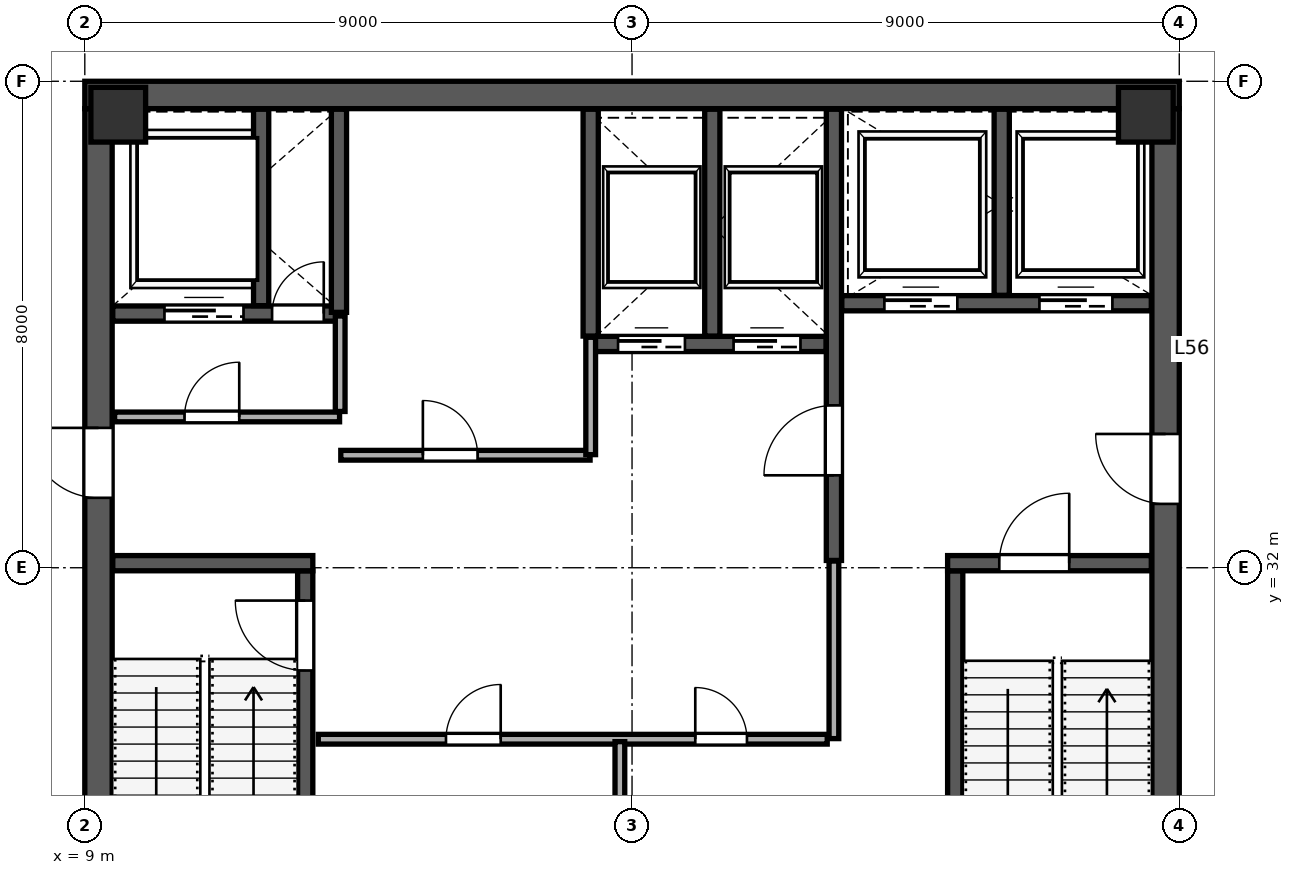
"""IFC4 building model, lengths in metres.
Left out: names, types, materials, properties, quantities, classifications, styles, units other than length and angle.
Written with IfcOpenShell. Run it as: python <this file> out.ifc"""

import sys

from ifc_helpers import new_model, si_unit, direction, frame, frame_2d, origin, origin_2d, place, context, subcontext, project, spatial, rectangle, extrude, source, transform, mapped, element, fill, save


model = new_model("IFC4")
c1 = context("Model", 3, precision=1e-05, world=origin(), true_north=direction((0.0, 1.0)))
c2 = subcontext(c1, "Body", "Model", "MODEL_VIEW")
j1 = project(units=[si_unit("LENGTHUNIT", "METRE"), si_unit("PLANEANGLEUNIT", "RADIAN")], contexts=[c1])
p1 = place(None, origin())
s1 = spatial("IfcSite", under=j1, at=p1, CompositionType="ELEMENT")
p2 = place(p1, origin())
s2 = spatial("IfcBuilding", under=s1, at=p2, CompositionType="ELEMENT")
p3 = place(p2, frame((0.0, 0.0, 250.0)))
s3 = spatial("IfcBuildingStorey", under=s2, at=p3, CompositionType="ELEMENT", Elevation=250.0)
m1 = source(origin(), c2, "Body", "SweptSolid", [
    extrude(rectangle(XDim=0.9, YDim=0.9, at=origin_2d()), origin(), (0.0, 0.0, 1.0), 4.198),
])
for number, where, z_axis, x_axis in (
    (1, (9.55, 39.45, 0.001), (0.0, 0.0, 1.0), (1.0, 0.0, 0.0)),
    (2, (26.45, 39.45, 0.001), (0.0, 0.0, 1.0), (1.0, 0.0, 0.0)),
):
    element("IfcColumn", number, at=place(p3, frame(where, z_axis=z_axis, x_axis=x_axis)), inside=s3, PredefinedType="COLUMN", context=c2, shape_type="MappedRepresentation", body=[
        mapped(m1, transform((0.0, 0.0, 0.0), scale=1.0)),
    ])
p4 = place(p3, frame((9.225, 24.45, 0.0), z_axis=(0.0, 0.0, 1.0), x_axis=(0.0, 1.0, 0.0)))
e3 = element("IfcWall", 3, at=p4, inside=s3, PredefinedType="SHEAR", context=c2, shape_type="SweptSolid", body=[
    extrude(rectangle(XDim=15.1, YDim=0.45, at=frame_2d((7.55, 0.0))), origin(), (0.0, 0.0, 1.0), 3.96),
])
p5 = place(p4, frame((8.7, 0.0, 0.0)))
e4 = element("IfcOpeningElement", 4, at=p5, cuts=e3, PredefinedType="OPENING", context=c2, shape_type="SweptSolid", body=[
    extrude(rectangle(XDim=1.15, YDim=2.2, at=frame_2d((0.575, 1.1))), frame((0.0, 0.235, 0.0), z_axis=(0.0, -1.0, 0.0), x_axis=(1.0, 0.0, 0.0)), (0.0, 0.0, 1.0), 0.47),
])
p6 = place(p3, frame((26.775, 24.45, 0.0), z_axis=(0.0, 0.0, 1.0), x_axis=(0.0, 1.0, 0.0)))
e5 = element("IfcWall", 5, at=p6, inside=s3, PredefinedType="SHEAR", context=c2, shape_type="SweptSolid", body=[
    extrude(rectangle(XDim=15.1, YDim=0.45, at=frame_2d((7.55, 0.0))), origin(), (0.0, 0.0, 1.0), 3.96),
])
p7 = place(p6, frame((8.6, 0.0, 0.0)))
e6 = element("IfcOpeningElement", 6, at=p7, cuts=e5, PredefinedType="OPENING", context=c2, shape_type="SweptSolid", body=[
    extrude(rectangle(XDim=1.15, YDim=2.2, at=frame_2d((0.575, 1.1))), frame((0.0, 0.235, 0.0), z_axis=(0.0, -1.0, 0.0), x_axis=(1.0, 0.0, 0.0)), (0.0, 0.0, 1.0), 0.47),
])
p8 = place(p3, frame((9.0, 39.775, 0.0), z_axis=(0.0, 0.0, 1.0), x_axis=(1.0, 0.0, 0.0)))
e7 = element("IfcWall", 7, at=p8, inside=s3, PredefinedType="SHEAR", context=c2, shape_type="SweptSolid", body=[
    extrude(rectangle(XDim=18.0, YDim=0.45, at=frame_2d((9.0, 0.0))), origin(), (0.0, 0.0, 1.0), 3.96),
])
p9 = place(p3, frame((12.625, 24.46, 0.0), z_axis=(0.0, 0.0, 1.0), x_axis=(0.0, 1.0, 0.0)))
e8 = element("IfcWall", 8, at=p9, inside=s3, PredefinedType="SHEAR", context=c2, shape_type="SweptSolid", body=[
    extrude(rectangle(XDim=7.49, YDim=0.25, at=frame_2d((3.745, 0.0))), origin(), (0.0, 0.0, 1.0), 3.96),
])
p10 = place(p9, frame((5.85, 0.0, 0.0)))
e9 = element("IfcOpeningElement", 9, at=p10, cuts=e8, PredefinedType="OPENING", context=c2, shape_type="SweptSolid", body=[
    extrude(rectangle(XDim=1.15, YDim=2.2, at=frame_2d((0.575, 1.1))), frame((0.0, 0.135, 0.0), z_axis=(0.0, -1.0, 0.0), x_axis=(1.0, 0.0, 0.0)), (0.0, 0.0, 1.0), 0.27),
])
p11 = place(p3, frame((9.46, 32.075, 0.0), z_axis=(0.0, 0.0, 1.0), x_axis=(1.0, 0.0, 0.0)))
e10 = element("IfcWall", 10, at=p11, inside=s3, PredefinedType="SHEAR", context=c2, shape_type="SweptSolid", body=[
    extrude(rectangle(XDim=3.29, YDim=0.25, at=frame_2d((1.645, 0.0))), origin(), (0.0, 0.0, 1.0), 3.96),
])
p12 = place(p3, frame((23.315, 24.46, 0.0), z_axis=(0.0, 0.0, 1.0), x_axis=(0.0, 1.0, 0.0)))
e11 = element("IfcWall", 11, at=p12, inside=s3, PredefinedType="SHEAR", context=c2, shape_type="SweptSolid", body=[
    extrude(rectangle(XDim=7.49, YDim=0.25, at=frame_2d((3.745, 0.0))), origin(), (0.0, 0.0, 1.0), 3.96),
])
p13 = place(p3, frame((23.19, 32.075, 0.0), z_axis=(0.0, 0.0, 1.0), x_axis=(1.0, 0.0, 0.0)))
e12 = element("IfcWall", 12, at=p13, inside=s3, PredefinedType="SHEAR", context=c2, shape_type="SweptSolid", body=[
    extrude(rectangle(XDim=3.35, YDim=0.25, at=frame_2d((1.675, 0.0))), origin(), (0.0, 0.0, 1.0), 3.96),
])
p14 = place(p13, frame((0.85, 0.0, 0.0)))
e13 = element("IfcOpeningElement", 13, at=p14, cuts=e12, PredefinedType="OPENING", context=c2, shape_type="SweptSolid", body=[
    extrude(rectangle(XDim=1.15, YDim=2.2, at=frame_2d((0.575, 1.1))), frame((0.0, 0.135, 0.0), z_axis=(0.0, -1.0, 0.0), x_axis=(1.0, 0.0, 0.0)), (0.0, 0.0, 1.0), 0.27),
])
p15 = place(p3, frame((21.32, 32.12, 0.0), z_axis=(0.0, 0.0, 1.0), x_axis=(0.0, 1.0, 0.0)))
e14 = element("IfcWall", 14, at=p15, inside=s3, PredefinedType="SHEAR", context=c2, shape_type="SweptSolid", body=[
    extrude(rectangle(XDim=7.42, YDim=0.25, at=frame_2d((3.71, 0.0))), origin(), (0.0, 0.0, 1.0), 3.96),
])
p16 = place(p15, frame((1.4, 0.0, 0.0)))
e15 = element("IfcOpeningElement", 15, at=p16, cuts=e14, PredefinedType="OPENING", context=c2, shape_type="SweptSolid", body=[
    extrude(rectangle(XDim=1.15, YDim=2.2, at=frame_2d((0.575, 1.1))), frame((0.0, 0.135, 0.0), z_axis=(0.0, -1.0, 0.0), x_axis=(1.0, 0.0, 0.0)), (0.0, 0.0, 1.0), 0.27),
])
p17 = place(p3, frame((9.46, 36.18, 0.0), z_axis=(0.0, 0.0, 1.0), x_axis=(1.0, 0.0, 0.0)))
e16 = element("IfcWall", 16, at=p17, inside=s3, PredefinedType="SHEAR", context=c2, shape_type="SweptSolid", body=[
    extrude(rectangle(XDim=3.79, YDim=0.25, at=frame_2d((1.895, 0.0))), origin(), (0.0, 0.0, 1.0), 3.96),
])
p18 = place(p17, frame((2.62, 0.0, 0.0)))
e17 = element("IfcOpeningElement", 17, at=p18, cuts=e16, PredefinedType="OPENING", context=c2, shape_type="SweptSolid", body=[
    extrude(rectangle(XDim=0.85, YDim=2.1, at=frame_2d((0.425, 1.05))), frame((0.0, 0.135, 0.0), z_axis=(0.0, -1.0, 0.0), x_axis=(1.0, 0.0, 0.0)), (0.0, 0.0, 1.0), 0.27),
])
p19 = place(p17, frame((0.85, 0.0, 0.0)))
e18 = element("IfcOpeningElement", 18, at=p19, cuts=e16, PredefinedType="OPENING", context=c2, shape_type="SweptSolid", body=[
    extrude(rectangle(XDim=1.3, YDim=2.25, at=frame_2d((0.65, 1.125))), frame((0.0, 0.135, 0.0), z_axis=(0.0, -1.0, 0.0), x_axis=(1.0, 0.0, 0.0)), (0.0, 0.0, 1.0), 0.27),
])
p20 = place(p3, frame((11.9, 36.31, 0.0), z_axis=(0.0, 0.0, 1.0), x_axis=(0.0, 1.0, 0.0)))
e19 = element("IfcWall", 19, at=p20, inside=s3, PredefinedType="SHEAR", context=c2, shape_type="SweptSolid", body=[
    extrude(rectangle(XDim=3.23, YDim=0.25, at=frame_2d((1.615, 0.0))), origin(), (0.0, 0.0, 1.0), 3.96),
])
p21 = place(p3, frame((21.45, 36.35, 0.0), z_axis=(0.0, 0.0, 1.0), x_axis=(1.0, 0.0, 0.0)))
e20 = element("IfcWall", 20, at=p21, inside=s3, PredefinedType="SHEAR", context=c2, shape_type="SweptSolid", body=[
    extrude(rectangle(XDim=5.09, YDim=0.25, at=frame_2d((2.545, 0.0))), origin(), (0.0, 0.0, 1.0), 3.96),
])
p22 = place(p21, frame((0.7, 0.0, 0.0)))
e21 = element("IfcOpeningElement", 21, at=p22, cuts=e20, PredefinedType="OPENING", context=c2, shape_type="SweptSolid", body=[
    extrude(rectangle(XDim=1.2, YDim=2.2, at=frame_2d((0.6, 1.1))), frame((0.0, 0.135, 0.0), z_axis=(0.0, -1.0, 0.0), x_axis=(1.0, 0.0, 0.0)), (0.0, 0.0, 1.0), 0.27),
])
p23 = place(p21, frame((3.25, 0.0, 0.0)))
e22 = element("IfcOpeningElement", 22, at=p23, cuts=e20, PredefinedType="OPENING", context=c2, shape_type="SweptSolid", body=[
    extrude(rectangle(XDim=1.2, YDim=2.2, at=frame_2d((0.6, 1.1))), frame((0.0, 0.135, 0.0), z_axis=(0.0, -1.0, 0.0), x_axis=(1.0, 0.0, 0.0)), (0.0, 0.0, 1.0), 0.27),
])
p24 = place(p3, frame((24.08, 36.48, 0.0), z_axis=(0.0, 0.0, 1.0), x_axis=(0.0, 1.0, 0.0)))
e23 = element("IfcWall", 23, at=p24, inside=s3, PredefinedType="SHEAR", context=c2, shape_type="SweptSolid", body=[
    extrude(rectangle(XDim=3.06, YDim=0.25, at=frame_2d((1.53, 0.0))), origin(), (0.0, 0.0, 1.0), 3.96),
])
p25 = place(p3, frame((13.18, 36.2, 0.0), z_axis=(0.0, 0.0, 1.0), x_axis=(0.0, 1.0, 0.0)))
e24 = element("IfcWall", 24, at=p25, inside=s3, PredefinedType="SHEAR", context=c2, shape_type="SweptSolid", body=[
    extrude(rectangle(XDim=3.34, YDim=0.25, at=frame_2d((1.67, 0.0))), origin(), (0.0, 0.0, 1.0), 3.96),
])
p26 = place(p3, frame((17.32, 35.68, 0.0), z_axis=(0.0, 0.0, 1.0), x_axis=(1.0, 0.0, 0.0)))
e25 = element("IfcWall", 25, at=p26, inside=s3, PredefinedType="SHEAR", context=c2, shape_type="SweptSolid", body=[
    extrude(rectangle(XDim=3.87, YDim=0.25, at=frame_2d((1.935, 0.0))), origin(), (0.0, 0.0, 1.0), 3.96),
])
p27 = place(p26, frame((0.45, 0.0, 0.0)))
e26 = element("IfcOpeningElement", 26, at=p27, cuts=e25, PredefinedType="OPENING", context=c2, shape_type="SweptSolid", body=[
    extrude(rectangle(XDim=1.1, YDim=2.2, at=frame_2d((0.55, 1.1))), frame((0.0, 0.135, 0.0), z_axis=(0.0, -1.0, 0.0), x_axis=(1.0, 0.0, 0.0)), (0.0, 0.0, 1.0), 0.27),
])
p28 = place(p26, frame((2.35, 0.0, 0.0)))
e27 = element("IfcOpeningElement", 27, at=p28, cuts=e25, PredefinedType="OPENING", context=c2, shape_type="SweptSolid", body=[
    extrude(rectangle(XDim=1.1, YDim=2.2, at=frame_2d((0.55, 1.1))), frame((0.0, 0.135, 0.0), z_axis=(0.0, -1.0, 0.0), x_axis=(1.0, 0.0, 0.0)), (0.0, 0.0, 1.0), 0.27),
])
for number, where, z_axis, x_axis in (
    (28, (17.32, 35.81, 0.0), (0.0, 0.0, 1.0), (0.0, 1.0, 0.0)),
    (29, (19.32, 35.81, 0.0), (0.0, 0.0, 1.0), (0.0, 1.0, 0.0)),
):
    element("IfcWall", number, at=place(p3, frame(where, z_axis=z_axis, x_axis=x_axis)), inside=s3, PredefinedType="SHEAR", context=c2, shape_type="SweptSolid", body=[
        extrude(rectangle(XDim=3.73, YDim=0.25, at=frame_2d((1.865, 0.0))), origin(), (0.0, 0.0, 1.0), 3.96),
    ])
p29 = place(p3, frame((9.49, 34.48, 0.0), z_axis=(0.0, 0.0, 1.0), x_axis=(1.0, 0.0, 0.0)))
e30 = element("IfcWall", 30, at=p29, inside=s3, PredefinedType="PARTITIONING", context=c2, shape_type="SweptSolid", body=[
    extrude(rectangle(XDim=3.7, YDim=0.16, at=frame_2d((1.85, 0.0))), origin(), (0.0, 0.0, 1.0), 3.96),
])
p30 = place(p29, frame((1.15, 0.0, 0.0)))
e31 = element("IfcOpeningElement", 31, at=p30, cuts=e30, PredefinedType="OPENING", context=c2, shape_type="SweptSolid", body=[
    extrude(rectangle(XDim=0.9, YDim=2.15, at=frame_2d((0.45, 1.075))), frame((0.0, 0.09, 0.0), z_axis=(0.0, -1.0, 0.0), x_axis=(1.0, 0.0, 0.0)), (0.0, 0.0, 1.0), 0.18),
])
p31 = place(p3, frame((13.2, 34.57, 0.0), z_axis=(0.0, 0.0, 1.0), x_axis=(0.0, 1.0, 0.0)))
e32 = element("IfcWall", 32, at=p31, inside=s3, PredefinedType="PARTITIONING", context=c2, shape_type="SweptSolid", body=[
    extrude(rectangle(XDim=1.57, YDim=0.16, at=frame_2d((0.785, 0.0))), origin(), (0.0, 0.0, 1.0), 3.96),
])
p32 = place(p3, frame((13.21, 33.85, 0.0), z_axis=(0.0, 0.0, 1.0), x_axis=(1.0, 0.0, 0.0)))
e33 = element("IfcWall", 33, at=p32, inside=s3, PredefinedType="PARTITIONING", context=c2, shape_type="SweptSolid", body=[
    extrude(rectangle(XDim=4.1, YDim=0.16, at=frame_2d((2.05, 0.0))), origin(), (0.0, 0.0, 1.0), 3.96),
])
p33 = place(p32, frame((1.35, 0.0, 0.0)))
e34 = element("IfcOpeningElement", 34, at=p33, cuts=e33, PredefinedType="OPENING", context=c2, shape_type="SweptSolid", body=[
    extrude(rectangle(XDim=0.9, YDim=2.15, at=frame_2d((0.45, 1.075))), frame((0.0, 0.09, 0.0), z_axis=(0.0, -1.0, 0.0), x_axis=(1.0, 0.0, 0.0)), (0.0, 0.0, 1.0), 0.18),
])
p34 = place(p3, frame((17.32, 33.86, 0.0), z_axis=(0.0, 0.0, 1.0), x_axis=(0.0, 1.0, 0.0)))
e35 = element("IfcWall", 35, at=p34, inside=s3, PredefinedType="PARTITIONING", context=c2, shape_type="SweptSolid", body=[
    extrude(rectangle(XDim=1.93, YDim=0.16, at=frame_2d((0.965, 0.0))), origin(), (0.0, 0.0, 1.0), 3.96),
])
p35 = place(p3, frame((12.84, 29.18, 0.0), z_axis=(0.0, 0.0, 1.0), x_axis=(1.0, 0.0, 0.0)))
e36 = element("IfcWall", 36, at=p35, inside=s3, PredefinedType="PARTITIONING", context=c2, shape_type="SweptSolid", body=[
    extrude(rectangle(XDim=8.37, YDim=0.16, at=frame_2d((4.185, 0.0))), origin(), (0.0, 0.0, 1.0), 3.96),
])
p36 = place(p35, frame((2.1, 0.0, 0.0)))
e37 = element("IfcOpeningElement", 37, at=p36, cuts=e36, PredefinedType="OPENING", context=c2, shape_type="SweptSolid", body=[
    extrude(rectangle(XDim=0.9, YDim=2.15, at=frame_2d((0.45, 1.075))), frame((0.0, 0.09, 0.0), z_axis=(0.0, -1.0, 0.0), x_axis=(1.0, 0.0, 0.0)), (0.0, 0.0, 1.0), 0.18),
])
p37 = place(p35, frame((6.2, 0.0, 0.0)))
e38 = element("IfcOpeningElement", 38, at=p37, cuts=e36, PredefinedType="OPENING", context=c2, shape_type="SweptSolid", body=[
    extrude(rectangle(XDim=0.85, YDim=2.1, at=frame_2d((0.425, 1.05))), frame((0.0, 0.09, 0.0), z_axis=(0.0, -1.0, 0.0), x_axis=(1.0, 0.0, 0.0)), (0.0, 0.0, 1.0), 0.18),
])
p38 = place(p3, frame((17.8, 24.54, 0.0), z_axis=(0.0, 0.0, 1.0), x_axis=(0.0, 1.0, 0.0)))
e39 = element("IfcWall", 39, at=p38, inside=s3, PredefinedType="PARTITIONING", context=c2, shape_type="SweptSolid", body=[
    extrude(rectangle(XDim=4.6, YDim=0.16, at=frame_2d((2.3, 0.0))), origin(), (0.0, 0.0, 1.0), 3.96),
])
p39 = place(p3, frame((21.32, 29.19, 0.0), z_axis=(0.0, 0.0, 1.0), x_axis=(0.0, 1.0, 0.0)))
e40 = element("IfcWall", 40, at=p39, inside=s3, PredefinedType="PARTITIONING", context=c2, shape_type="SweptSolid", body=[
    extrude(rectangle(XDim=2.92, YDim=0.16, at=frame_2d((1.46, 0.0))), origin(), (0.0, 0.0, 1.0), 3.96),
])
p40 = place(p3, frame((17.993, 51.134, 0.0), z_axis=(0.0, 0.0, 1.0), x_axis=(0.707106781187, -0.707106781187, 0.0)))
e41 = element("IfcWall", 41, at=p40, inside=s3, PredefinedType="PARTITIONING", context=c2, shape_type="SweptSolid", body=[
    extrude(rectangle(XDim=22.27, YDim=0.1, at=frame_2d((11.135, 0.0))), origin(), (0.0, 0.0, 1.0), 3.96),
])
p41 = place(p40, frame((10.8, 0.0, 0.0)))
e42 = element("IfcOpeningElement", 42, at=p41, cuts=e41, PredefinedType="OPENING", context=c2, shape_type="SweptSolid", body=[
    extrude(rectangle(XDim=0.95, YDim=2.15, at=frame_2d((0.475, 1.075))), frame((0.0, 0.06, 0.0), z_axis=(0.0, -1.0, 0.0), x_axis=(1.0, 0.0, 0.0)), (0.0, 0.0, 1.0), 0.12),
])
p42 = place(p3, frame((0.775, 33.973, 0.0), z_axis=(0.0, 0.0, 1.0), x_axis=(0.707106781187, 0.707106781187, 0.0)))
e43 = element("IfcWall", 43, at=p42, inside=s3, PredefinedType="PARTITIONING", context=c2, shape_type="SweptSolid", body=[
    extrude(rectangle(XDim=29.28, YDim=0.115, at=frame_2d((14.64, 0.0))), origin(), (0.0, 0.0, 1.0), 3.96),
])
p43 = place(p42, frame((2.2, 0.0, 0.0)))
e44 = element("IfcOpeningElement", 44, at=p43, cuts=e43, PredefinedType="OPENING", context=c2, shape_type="SweptSolid", body=[
    extrude(rectangle(XDim=0.95, YDim=2.15, at=frame_2d((0.475, 1.075))), frame((0.0, 0.067, 0.0), z_axis=(0.0, -1.0, 0.0), x_axis=(1.0, 0.0, 0.0)), (0.0, 0.0, 1.0), 0.135),
])
m2 = source(origin(), c2, "Body", "SweptSolid", [
    extrude(rectangle(XDim=1.15, YDim=2.2, at=frame_2d((0.575, 1.1))), frame((0.0, 0.025, 0.0), z_axis=(0.0, -1.0, 0.0), x_axis=(1.0, 0.0, 0.0)), (0.0, 0.0, 1.0), 0.05),
])
p44 = place(p10, origin())
e45 = element("IfcDoor", 45, at=p44, inside=s3, OperationType="SINGLE_SWING_RIGHT", PredefinedType="DOOR", context=c2, shape_type="MappedRepresentation", body=[
    mapped(m2, transform((0.0, 0.0, 0.0), scale=1.0)),
])
fill(e9, e45)
m3 = source(origin(), c2, "Body", "SweptSolid", [
    extrude(rectangle(XDim=1.15, YDim=2.2, at=frame_2d((0.575, 1.1))), frame((0.0, 0.025, 0.0), z_axis=(0.0, -1.0, 0.0), x_axis=(1.0, 0.0, 0.0)), (0.0, 0.0, 1.0), 0.05),
])
p45 = place(p16, origin())
e46 = element("IfcDoor", 46, at=p45, inside=s3, OperationType="SINGLE_SWING_LEFT", PredefinedType="DOOR", context=c2, shape_type="MappedRepresentation", body=[
    mapped(m3, transform((0.0, 0.0, 0.0), scale=1.0)),
])
fill(e15, e46)
p46 = place(p14, origin())
e47 = element("IfcDoor", 47, at=p46, inside=s3, OperationType="SINGLE_SWING_RIGHT", PredefinedType="DOOR", context=c2, shape_type="MappedRepresentation", body=[
    mapped(m2, transform((0.0, 0.0, 0.0), scale=1.0)),
])
fill(e13, e47)
p47 = place(p7, origin())
e48 = element("IfcDoor", 48, at=p47, inside=s3, OperationType="SINGLE_SWING_RIGHT", PredefinedType="DOOR", context=c2, shape_type="MappedRepresentation", body=[
    mapped(m3, transform((0.0, 0.0, 0.0), scale=1.0)),
])
fill(e6, e48)
p48 = place(p5, origin())
e49 = element("IfcDoor", 49, at=p48, inside=s3, OperationType="SINGLE_SWING_RIGHT", PredefinedType="DOOR", context=c2, shape_type="MappedRepresentation", body=[
    mapped(m3, transform((0.0, 0.0, 0.0), scale=1.0)),
])
fill(e4, e49)
m4 = source(origin(), c2, "Body", "SweptSolid", [
    extrude(rectangle(XDim=0.85, YDim=2.1, at=frame_2d((0.425, 1.05))), frame((0.0, 0.025, 0.0), z_axis=(0.0, -1.0, 0.0), x_axis=(1.0, 0.0, 0.0)), (0.0, 0.0, 1.0), 0.05),
])
p49 = place(p18, origin())
e50 = element("IfcDoor", 50, at=p49, inside=s3, OperationType="SINGLE_SWING_RIGHT", PredefinedType="DOOR", context=c2, shape_type="MappedRepresentation", body=[
    mapped(m4, transform((0.0, 0.0, 0.0), scale=1.0)),
])
fill(e17, e50)
m5 = source(origin(), c2, "Body", "SweptSolid", [
    extrude(rectangle(XDim=1.1, YDim=2.2, at=frame_2d((0.55, 1.1))), frame((0.0, 0.025, 0.0), z_axis=(0.0, -1.0, 0.0), x_axis=(1.0, 0.0, 0.0)), (0.0, 0.0, 1.0), 0.05),
])
p50 = place(p27, origin())
e51 = element("IfcDoor", 51, at=p50, inside=s3, OperationType="SLIDING_TO_LEFT", PredefinedType="DOOR", context=c2, shape_type="MappedRepresentation", body=[
    mapped(m5, transform((0.0, 0.0, 0.0), scale=1.0)),
])
fill(e26, e51)
p51 = place(p28, origin())
e52 = element("IfcDoor", 52, at=p51, inside=s3, OperationType="SLIDING_TO_RIGHT", PredefinedType="DOOR", context=c2, shape_type="MappedRepresentation", body=[
    mapped(m5, transform((0.0, 0.0, 0.0), scale=1.0)),
])
fill(e27, e52)
m6 = source(origin(), c2, "Body", "SweptSolid", [
    extrude(rectangle(XDim=1.2, YDim=2.2, at=frame_2d((0.6, 1.1))), frame((0.0, 0.025, 0.0), z_axis=(0.0, -1.0, 0.0), x_axis=(1.0, 0.0, 0.0)), (0.0, 0.0, 1.0), 0.05),
])
p52 = place(p22, origin())
e53 = element("IfcDoor", 53, at=p52, inside=s3, OperationType="SLIDING_TO_LEFT", PredefinedType="DOOR", context=c2, shape_type="MappedRepresentation", body=[
    mapped(m6, transform((0.0, 0.0, 0.0), scale=1.0)),
])
fill(e21, e53)
p53 = place(p23, origin())
e54 = element("IfcDoor", 54, at=p53, inside=s3, OperationType="SLIDING_TO_RIGHT", PredefinedType="DOOR", context=c2, shape_type="MappedRepresentation", body=[
    mapped(m6, transform((0.0, 0.0, 0.0), scale=1.0)),
])
fill(e22, e54)
m7 = source(origin(), c2, "Body", "SweptSolid", [
    extrude(rectangle(XDim=1.3, YDim=2.25, at=frame_2d((0.65, 1.125))), frame((0.0, 0.025, 0.0), z_axis=(0.0, -1.0, 0.0), x_axis=(1.0, 0.0, 0.0)), (0.0, 0.0, 1.0), 0.05),
])
p54 = place(p19, origin())
e55 = element("IfcDoor", 55, at=p54, inside=s3, OperationType="SLIDING_TO_LEFT", PredefinedType="DOOR", context=c2, shape_type="MappedRepresentation", body=[
    mapped(m7, transform((0.0, 0.0, 0.0), scale=1.0)),
])
fill(e18, e55)
m8 = source(origin(), c2, "Body", "SweptSolid", [
    extrude(rectangle(XDim=0.9, YDim=2.15, at=frame_2d((0.45, 1.075))), frame((0.0, 0.025, 0.0), z_axis=(0.0, -1.0, 0.0), x_axis=(1.0, 0.0, 0.0)), (0.0, 0.0, 1.0), 0.05),
])
p55 = place(p30, origin())
e56 = element("IfcDoor", 56, at=p55, inside=s3, OperationType="SINGLE_SWING_RIGHT", PredefinedType="DOOR", context=c2, shape_type="MappedRepresentation", body=[
    mapped(m8, transform((0.0, 0.0, 0.0), scale=1.0)),
])
fill(e31, e56)
p56 = place(p33, origin())
e57 = element("IfcDoor", 57, at=p56, inside=s3, OperationType="SINGLE_SWING_LEFT", PredefinedType="DOOR", context=c2, shape_type="MappedRepresentation", body=[
    mapped(m8, transform((0.0, 0.0, 0.0), scale=1.0)),
])
fill(e34, e57)
p57 = place(p36, origin())
e58 = element("IfcDoor", 58, at=p57, inside=s3, OperationType="SINGLE_SWING_RIGHT", PredefinedType="DOOR", context=c2, shape_type="MappedRepresentation", body=[
    mapped(m8, transform((0.0, 0.0, 0.0), scale=1.0)),
])
fill(e37, e58)
p58 = place(p37, origin())
e59 = element("IfcDoor", 59, at=p58, inside=s3, OperationType="SINGLE_SWING_LEFT", PredefinedType="DOOR", context=c2, shape_type="MappedRepresentation", body=[
    mapped(m4, transform((0.0, 0.0, 0.0), scale=1.0)),
])
fill(e38, e59)
save(model, sys.argv[1])
